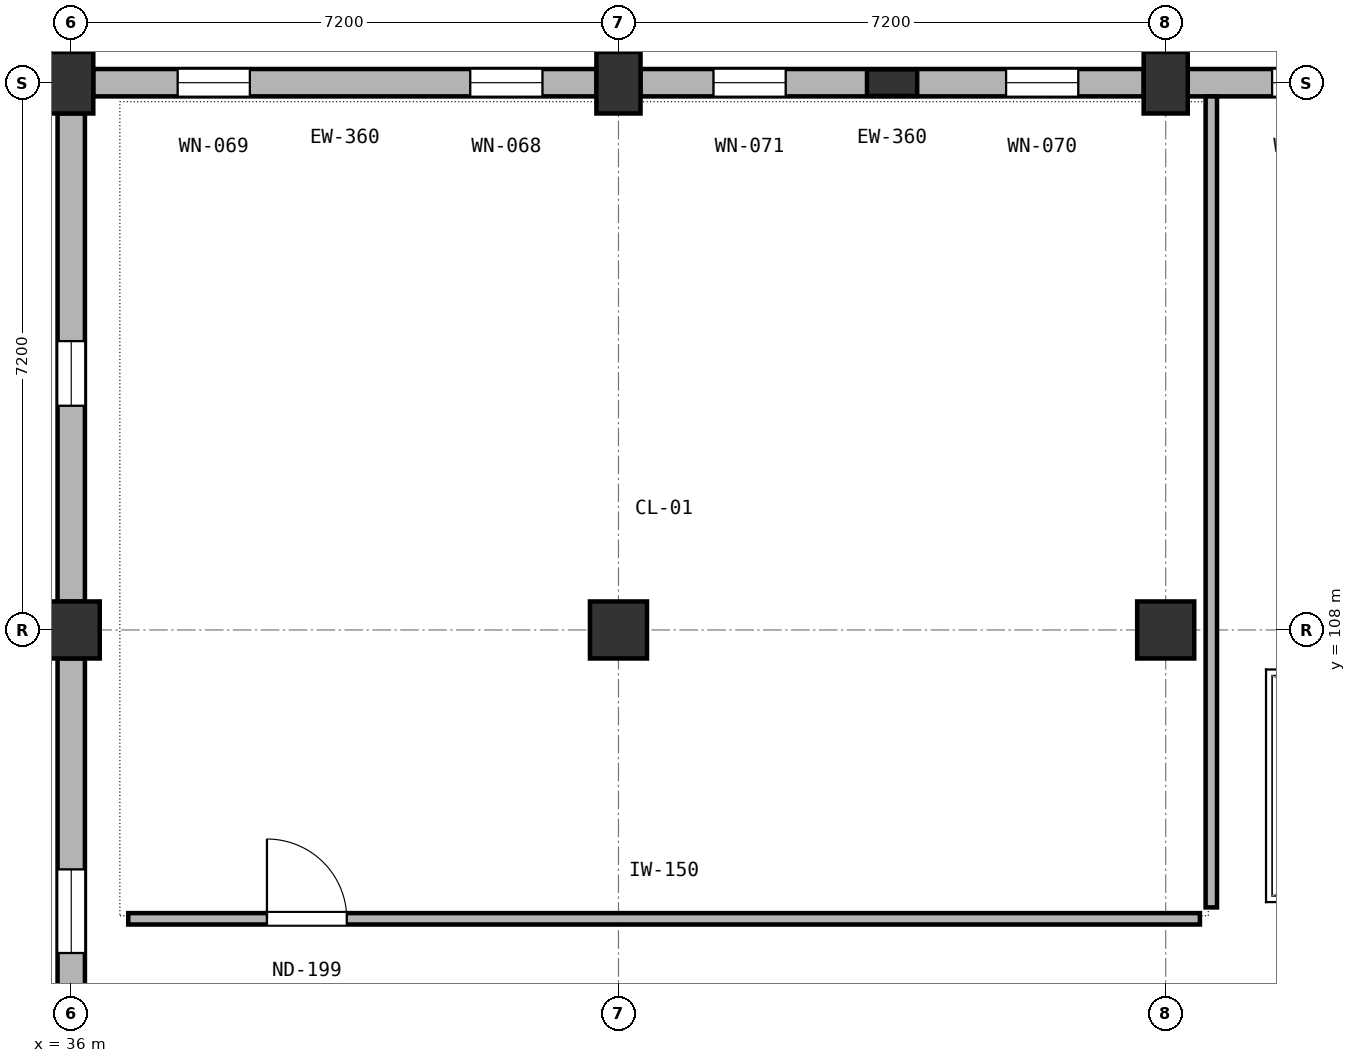
"""IFC4 building model, lengths in metres.
Left out: names, types, materials, properties, quantities, classifications, styles, units other than length and angle.
Written with IfcOpenShell. Run it as: python <this file> out.ifc"""

import sys

from ifc_helpers import new_model, si_unit, direction, frame, frame_2d, origin, origin_2d, place, context, subcontext, project, spatial, rectangle, extrude, element, fill, save


model = new_model("IFC4")
c1 = context("Model", 3, precision=1e-05, world=origin(), true_north=direction((0.0, 1.0)))
c2 = subcontext(c1, "Body", "Model", "MODEL_VIEW")
j1 = project(units=[si_unit("LENGTHUNIT", "METRE"), si_unit("PLANEANGLEUNIT", "RADIAN")], contexts=[c1])
p1 = place(None, origin())
s1 = spatial("IfcSite", under=j1, at=p1, CompositionType="ELEMENT")
p2 = place(p1, origin())
s2 = spatial("IfcBuilding", under=s1, at=p2, CompositionType="ELEMENT")
p3 = place(p2, frame((0.0, 0.0, 14.4)))
s3 = spatial("IfcBuildingStorey", under=s2, at=p3, CompositionType="ELEMENT", Elevation=14.4)
p4 = place(p3, frame((36.0, 108.0, 0.0), z_axis=(0.0, 0.0, 1.0), x_axis=(1.0, 0.0, 0.0)))
e1 = element("IfcColumn", 1, at=p4, inside=s3, PredefinedType="COLUMN", context=c2, shape_type="SweptSolid", body=[
    extrude(rectangle(XDim=0.75, YDim=0.75, at=origin_2d()), origin(), (0.0, 0.0, 1.0), 4.2),
])
p5 = place(p3, frame((36.0, 115.2, 0.0), z_axis=(0.0, 0.0, 1.0), x_axis=(1.0, 0.0, 0.0)))
e2 = element("IfcColumn", 2, at=p5, inside=s3, PredefinedType="COLUMN", context=c2, shape_type="SweptSolid", body=[
    extrude(rectangle(XDim=0.58, YDim=0.81, at=origin_2d()), origin(), (0.0, 0.0, 1.0), 4.2),
])
p6 = place(p3, frame((43.2, 108.0, 0.0), z_axis=(0.0, 0.0, 1.0), x_axis=(1.0, 0.0, 0.0)))
e3 = element("IfcColumn", 3, at=p6, inside=s3, PredefinedType="COLUMN", context=c2, shape_type="SweptSolid", body=[
    extrude(rectangle(XDim=0.75, YDim=0.75, at=origin_2d()), origin(), (0.0, 0.0, 1.0), 4.2),
])
p7 = place(p3, frame((43.2, 115.2, 0.0), z_axis=(0.0, 0.0, 1.0), x_axis=(1.0, 0.0, 0.0)))
e4 = element("IfcColumn", 4, at=p7, inside=s3, PredefinedType="COLUMN", context=c2, shape_type="SweptSolid", body=[
    extrude(rectangle(XDim=0.58, YDim=0.81, at=origin_2d()), origin(), (0.0, 0.0, 1.0), 4.2),
])
p8 = place(p3, frame((50.4, 108.0, 0.0), z_axis=(0.0, 0.0, 1.0), x_axis=(1.0, 0.0, 0.0)))
e5 = element("IfcColumn", 5, at=p8, inside=s3, PredefinedType="COLUMN", context=c2, shape_type="SweptSolid", body=[
    extrude(rectangle(XDim=0.75, YDim=0.75, at=origin_2d()), origin(), (0.0, 0.0, 1.0), 4.2),
])
p9 = place(p3, frame((50.4, 115.2, 0.0), z_axis=(0.0, 0.0, 1.0), x_axis=(1.0, 0.0, 0.0)))
e6 = element("IfcColumn", 6, at=p9, inside=s3, PredefinedType="COLUMN", context=c2, shape_type="SweptSolid", body=[
    extrude(rectangle(XDim=0.58, YDim=0.81, at=origin_2d()), origin(), (0.0, 0.0, 1.0), 4.2),
])
p10 = place(p3, frame((46.8, 115.2, 0.0), z_axis=(0.0, 0.0, 1.0), x_axis=(1.0, 0.0, 0.0)))
e7 = element("IfcColumn", 7, at=p10, inside=s3, PredefinedType="PILASTER", context=c2, shape_type="SweptSolid", body=[
    extrude(rectangle(XDim=0.66, YDim=0.35, at=origin_2d()), origin(), (0.0, 0.0, 1.0), 4.2),
])
p11 = place(p3, frame((42.912, 115.2, 0.0), z_axis=(0.0, 0.0, 1.0), x_axis=(-1.0, 0.0, 0.0)))
e8 = element("IfcWall", 8, at=p11, inside=s3, PredefinedType="SOLIDWALL", context=c2, shape_type="SweptSolid", body=[
    extrude(rectangle(XDim=6.624, YDim=0.36, at=frame_2d((3.312, 0.0))), origin(), (0.0, 0.0, 1.0), 3.04),
])
p12 = place(p11, frame((0.712, 0.0, 0.7)))
e9 = element("IfcOpeningElement", 9, at=p12, cuts=e8, PredefinedType="OPENING", context=c2, shape_type="SweptSolid", body=[
    extrude(rectangle(XDim=0.95, YDim=2.14, at=frame_2d((0.475, 1.07))), frame((0.0, 0.19, 0.0), z_axis=(0.0, -1.0, 0.0), x_axis=(1.0, 0.0, 0.0)), (0.0, 0.0, 1.0), 0.38),
])
p13 = place(p11, frame((4.562, 0.0, 0.7)))
e10 = element("IfcOpeningElement", 10, at=p13, cuts=e8, PredefinedType="OPENING", context=c2, shape_type="SweptSolid", body=[
    extrude(rectangle(XDim=0.95, YDim=2.14, at=frame_2d((0.475, 1.07))), frame((0.0, 0.19, 0.0), z_axis=(0.0, -1.0, 0.0), x_axis=(1.0, 0.0, 0.0)), (0.0, 0.0, 1.0), 0.38),
])
p14 = place(p3, frame((50.112, 115.2, 0.0), z_axis=(0.0, 0.0, 1.0), x_axis=(-1.0, 0.0, 0.0)))
e11 = element("IfcWall", 11, at=p14, inside=s3, PredefinedType="SOLIDWALL", context=c2, shape_type="SweptSolid", body=[
    extrude(rectangle(XDim=6.624, YDim=0.36, at=frame_2d((3.312, 0.0))), origin(), (0.0, 0.0, 1.0), 3.04),
])
p15 = place(p14, frame((0.862, 0.0, 0.7)))
e12 = element("IfcOpeningElement", 12, at=p15, cuts=e11, PredefinedType="OPENING", context=c2, shape_type="SweptSolid", body=[
    extrude(rectangle(XDim=0.95, YDim=2.14, at=frame_2d((0.475, 1.07))), frame((0.0, 0.19, 0.0), z_axis=(0.0, -1.0, 0.0), x_axis=(1.0, 0.0, 0.0)), (0.0, 0.0, 1.0), 0.38),
])
p16 = place(p14, frame((4.712, 0.0, 0.7)))
e13 = element("IfcOpeningElement", 13, at=p16, cuts=e11, PredefinedType="OPENING", context=c2, shape_type="SweptSolid", body=[
    extrude(rectangle(XDim=0.95, YDim=2.14, at=frame_2d((0.475, 1.07))), frame((0.0, 0.19, 0.0), z_axis=(0.0, -1.0, 0.0), x_axis=(1.0, 0.0, 0.0)), (0.0, 0.0, 1.0), 0.38),
])
p17 = place(p3, frame((57.312, 115.2, 0.0), z_axis=(0.0, 0.0, 1.0), x_axis=(-1.0, 0.0, 0.0)))
e14 = element("IfcWall", 14, at=p17, inside=s3, PredefinedType="SOLIDWALL", context=c2, shape_type="SweptSolid", body=[
    extrude(rectangle(XDim=6.624, YDim=0.36, at=frame_2d((3.312, 0.0))), origin(), (0.0, 0.0, 1.0), 3.04),
])
p18 = place(p17, frame((0.712, 0.0, 0.7)))
e15 = element("IfcOpeningElement", 15, at=p18, cuts=e14, PredefinedType="OPENING", context=c2, shape_type="SweptSolid", body=[
    extrude(rectangle(XDim=0.95, YDim=2.14, at=frame_2d((0.475, 1.07))), frame((0.0, 0.19, 0.0), z_axis=(0.0, -1.0, 0.0), x_axis=(1.0, 0.0, 0.0)), (0.0, 0.0, 1.0), 0.38),
])
p19 = place(p17, frame((4.562, 0.0, 0.7)))
e16 = element("IfcOpeningElement", 16, at=p19, cuts=e14, PredefinedType="OPENING", context=c2, shape_type="SweptSolid", body=[
    extrude(rectangle(XDim=0.95, YDim=2.14, at=frame_2d((0.475, 1.07))), frame((0.0, 0.19, 0.0), z_axis=(0.0, -1.0, 0.0), x_axis=(1.0, 0.0, 0.0)), (0.0, 0.0, 1.0), 0.38),
])
p20 = place(p3, frame((36.0, 101.173, 0.0), z_axis=(0.0, 0.0, 1.0), x_axis=(0.0, 1.0, 0.0)))
e17 = element("IfcWall", 17, at=p20, inside=s3, PredefinedType="SOLIDWALL", context=c2, shape_type="SweptSolid", body=[
    extrude(rectangle(XDim=6.454, YDim=0.36, at=frame_2d((3.227, 0.0))), origin(), (0.0, 0.0, 1.0), 3.04),
])
p21 = place(p20, frame((2.577, 0.0, 0.7)))
e18 = element("IfcOpeningElement", 18, at=p21, cuts=e17, PredefinedType="OPENING", context=c2, shape_type="SweptSolid", body=[
    extrude(rectangle(XDim=1.1, YDim=2.19, at=frame_2d((0.55, 1.095))), frame((0.0, 0.19, 0.0), z_axis=(0.0, -1.0, 0.0), x_axis=(1.0, 0.0, 0.0)), (0.0, 0.0, 1.0), 0.38),
])
p22 = place(p3, frame((36.0, 108.373, 0.0), z_axis=(0.0, 0.0, 1.0), x_axis=(0.0, 1.0, 0.0)))
e19 = element("IfcWall", 19, at=p22, inside=s3, PredefinedType="SOLIDWALL", context=c2, shape_type="SweptSolid", body=[
    extrude(rectangle(XDim=6.424, YDim=0.36, at=frame_2d((3.212, 0.0))), origin(), (0.0, 0.0, 1.0), 3.04),
])
p23 = place(p22, frame((2.577, 0.0, 0.7)))
e20 = element("IfcOpeningElement", 20, at=p23, cuts=e19, PredefinedType="OPENING", context=c2, shape_type="SweptSolid", body=[
    extrude(rectangle(XDim=0.85, YDim=2.19, at=frame_2d((0.425, 1.095))), frame((0.0, 0.19, 0.0), z_axis=(0.0, -1.0, 0.0), x_axis=(1.0, 0.0, 0.0)), (0.0, 0.0, 1.0), 0.38),
])
p24 = place(p3, frame((36.75, 104.2, 0.0), z_axis=(0.0, 0.0, 1.0), x_axis=(1.0, 0.0, 0.0)))
e21 = element("IfcWall", 21, at=p24, inside=s3, PredefinedType="PARTITIONING", context=c2, shape_type="SweptSolid", body=[
    extrude(rectangle(XDim=14.1, YDim=0.15, at=frame_2d((7.05, 0.0))), origin(), (0.0, 0.0, 1.0), 3.08),
])
p25 = place(p24, frame((1.825, 0.0, 0.0)))
e22 = element("IfcOpeningElement", 22, at=p25, cuts=e21, PredefinedType="OPENING", context=c2, shape_type="SweptSolid", body=[
    extrude(rectangle(XDim=1.05, YDim=2.15, at=frame_2d((0.525, 1.075))), frame((0.0, 0.085, 0.0), z_axis=(0.0, -1.0, 0.0), x_axis=(1.0, 0.0, 0.0)), (0.0, 0.0, 1.0), 0.17),
])
p26 = place(p3, frame((51.0, 104.35, 0.0), z_axis=(0.0, 0.0, 1.0), x_axis=(0.0, 1.0, 0.0)))
e23 = element("IfcWall", 23, at=p26, inside=s3, PredefinedType="PARTITIONING", context=c2, shape_type="SweptSolid", body=[
    extrude(rectangle(XDim=10.67, YDim=0.15, at=frame_2d((5.335, 0.0))), origin(), (0.0, 0.0, 1.0), 3.08),
])
p27 = place(p12, origin())
e24 = element("IfcWindow", 24, at=p27, inside=s3, PartitioningType="SINGLE_PANEL", PredefinedType="WINDOW", context=c2, shape_type="SweptSolid", body=[
    extrude(rectangle(XDim=0.95, YDim=2.14, at=frame_2d((0.475, 1.07))), frame((0.0, 0.03, 0.0), z_axis=(0.0, -1.0, 0.0), x_axis=(1.0, 0.0, 0.0)), (0.0, 0.0, 1.0), 0.06),
])
fill(e9, e24)
p28 = place(p13, origin())
e25 = element("IfcWindow", 25, at=p28, inside=s3, PartitioningType="SINGLE_PANEL", PredefinedType="WINDOW", context=c2, shape_type="SweptSolid", body=[
    extrude(rectangle(XDim=0.95, YDim=2.14, at=frame_2d((0.475, 1.07))), frame((0.0, 0.03, 0.0), z_axis=(0.0, -1.0, 0.0), x_axis=(1.0, 0.0, 0.0)), (0.0, 0.0, 1.0), 0.06),
])
fill(e10, e25)
p29 = place(p15, origin())
e26 = element("IfcWindow", 26, at=p29, inside=s3, PartitioningType="SINGLE_PANEL", PredefinedType="WINDOW", context=c2, shape_type="SweptSolid", body=[
    extrude(rectangle(XDim=0.95, YDim=2.14, at=frame_2d((0.475, 1.07))), frame((0.0, 0.03, 0.0), z_axis=(0.0, -1.0, 0.0), x_axis=(1.0, 0.0, 0.0)), (0.0, 0.0, 1.0), 0.06),
])
fill(e12, e26)
p30 = place(p16, origin())
e27 = element("IfcWindow", 27, at=p30, inside=s3, PartitioningType="SINGLE_PANEL", PredefinedType="WINDOW", context=c2, shape_type="SweptSolid", body=[
    extrude(rectangle(XDim=0.95, YDim=2.14, at=frame_2d((0.475, 1.07))), frame((0.0, 0.03, 0.0), z_axis=(0.0, -1.0, 0.0), x_axis=(1.0, 0.0, 0.0)), (0.0, 0.0, 1.0), 0.06),
])
fill(e13, e27)
p31 = place(p19, origin())
e28 = element("IfcWindow", 28, at=p31, inside=s3, PartitioningType="SINGLE_PANEL", PredefinedType="WINDOW", context=c2, shape_type="SweptSolid", body=[
    extrude(rectangle(XDim=0.95, YDim=2.14, at=frame_2d((0.475, 1.07))), frame((0.0, 0.03, 0.0), z_axis=(0.0, -1.0, 0.0), x_axis=(1.0, 0.0, 0.0)), (0.0, 0.0, 1.0), 0.06),
])
fill(e16, e28)
p32 = place(p21, origin())
e29 = element("IfcWindow", 29, at=p32, inside=s3, PartitioningType="SINGLE_PANEL", PredefinedType="WINDOW", context=c2, shape_type="SweptSolid", body=[
    extrude(rectangle(XDim=1.1, YDim=2.19, at=frame_2d((0.55, 1.095))), frame((0.0, 0.03, 0.0), z_axis=(0.0, -1.0, 0.0), x_axis=(1.0, 0.0, 0.0)), (0.0, 0.0, 1.0), 0.06),
])
fill(e18, e29)
p33 = place(p23, origin())
e30 = element("IfcWindow", 30, at=p33, inside=s3, PartitioningType="SINGLE_PANEL", PredefinedType="WINDOW", context=c2, shape_type="SweptSolid", body=[
    extrude(rectangle(XDim=0.85, YDim=2.19, at=frame_2d((0.425, 1.095))), frame((0.0, 0.03, 0.0), z_axis=(0.0, -1.0, 0.0), x_axis=(1.0, 0.0, 0.0)), (0.0, 0.0, 1.0), 0.06),
])
fill(e20, e30)
p34 = place(p25, origin())
e31 = element("IfcDoor", 31, at=p34, inside=s3, OperationType="SINGLE_SWING_LEFT", PredefinedType="DOOR", context=c2, shape_type="SweptSolid", body=[
    extrude(rectangle(XDim=1.05, YDim=2.15, at=frame_2d((0.525, 1.075))), frame((0.0, 0.025, 0.0), z_axis=(0.0, -1.0, 0.0), x_axis=(1.0, 0.0, 0.0)), (0.0, 0.0, 1.0), 0.05),
])
fill(e22, e31)
save(model, sys.argv[1])
